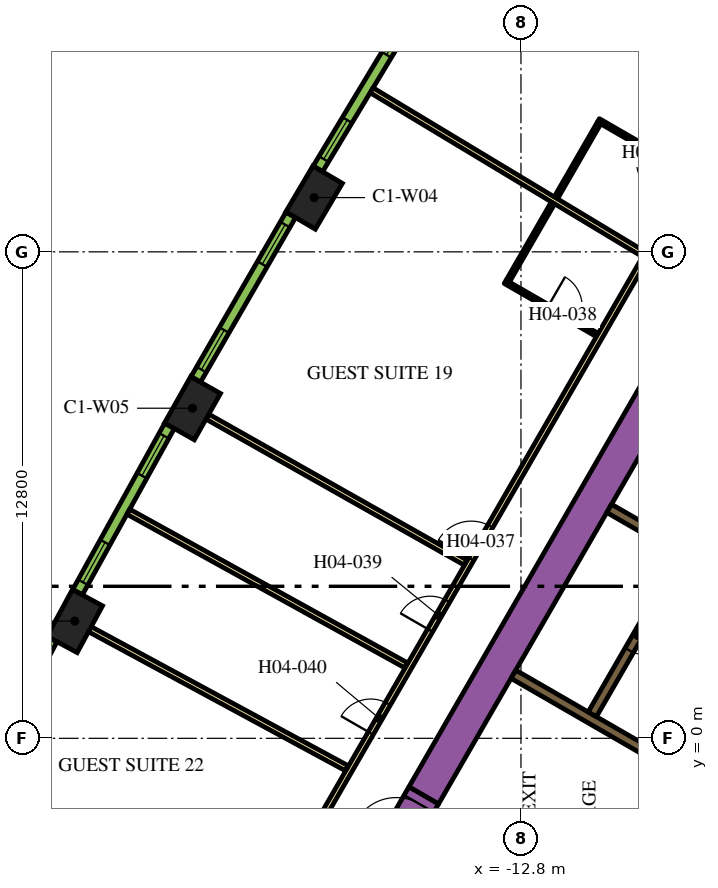
"""IFC4 building model, lengths in metres.
Left out: names, types, materials, properties, quantities, classifications, styles, units other than length and angle.
Written with IfcOpenShell. Run it as: python <this file> out.ifc"""

import sys

from ifc_helpers import new_model, si_unit, direction, frame, frame_2d, origin, origin_2d, place, context, subcontext, project, spatial, rectangle, extrude, element, fill, save


model = new_model("IFC4")
c1 = context("Model", 3, precision=1e-05, world=origin(), true_north=direction((0.0, 1.0)))
c2 = subcontext(c1, "Body", "Model", "MODEL_VIEW")
j1 = project(units=[si_unit("LENGTHUNIT", "METRE"), si_unit("PLANEANGLEUNIT", "RADIAN")], contexts=[c1])
p1 = place(None, origin())
s1 = spatial("IfcSite", under=j1, at=p1, CompositionType="ELEMENT")
p2 = place(p1, origin())
s2 = spatial("IfcBuilding", under=s1, at=p2, CompositionType="ELEMENT")
p3 = place(p2, frame((0.0, 0.0, 70.5)))
s3 = spatial("IfcBuildingStorey", under=s2, at=p3, CompositionType="ELEMENT", Elevation=70.5)
for number, where, z_axis, x_axis in (
    (1, (-18.243, 14.228, 0.0), (0.0, 0.0, 1.0), (-0.508, -0.861, 0.0)),
    (2, (-21.443, 8.685, 0.0), (0.0, 0.0, 1.0), (-0.492, -0.871, 0.0)),
    (3, (-24.54, 3.085, 0.0), (0.0, 0.0, 1.0), (-0.476, -0.88, 0.0)),
):
    element("IfcColumn", number, at=place(p3, frame(where, z_axis=z_axis, x_axis=x_axis)), inside=s3, PredefinedType="COLUMN", context=c2, shape_type="SweptSolid", body=[
        extrude(rectangle(XDim=1.4, YDim=0.9, at=origin_2d()), origin(), (0.0, 0.0, 1.0), 3.9),
    ])
p4 = place(p3, frame((-15.36, -1.503, 0.0), z_axis=(0.0, 0.0, 1.0), x_axis=(0.50000389221, 0.866023156604, 0.0)))
e4 = element("IfcWall", 4, at=p4, inside=s3, PredefinedType="SOLIDWALL", context=c2, shape_type="SweptSolid", body=[
    extrude(rectangle(XDim=21.0, YDim=0.9, at=frame_2d((10.5, 0.0))), origin(), (0.0, 0.0, 1.0), 3.9),
])
p5 = place(p3, frame((-8.106, -1.14, 0.0), z_axis=(0.0, 0.0, 1.0), x_axis=(-0.866000643155, 0.500042884217, 0.0)))
e5 = element("IfcWall", 5, at=p5, inside=s3, PredefinedType="SOLIDWALL", context=c2, shape_type="SweptSolid", body=[
    extrude(rectangle(XDim=5.65, YDim=0.25, at=frame_2d((2.825, 0.0))), origin(), (0.0, 0.0, 1.0), 3.9),
])
p6 = place(p3, frame((-8.574, 4.95, 0.0), z_axis=(0.0, 0.0, 1.0), x_axis=(-0.866008176907, 0.50002983664, 0.0)))
e6 = element("IfcWall", 6, at=p6, inside=s3, PredefinedType="SOLIDWALL", context=c2, shape_type="SweptSolid", body=[
    extrude(rectangle(XDim=2.2, YDim=0.25, at=frame_2d((1.1, 0.0))), origin(), (0.0, 0.0, 1.0), 3.9),
])
p7 = place(p3, frame((-6.008, 9.144, 0.0), z_axis=(0.0, 0.0, 1.0), x_axis=(-0.500006956611, -0.866021387346, 0.0)))
e7 = element("IfcWall", 7, at=p7, inside=s3, PredefinedType="SOLIDWALL", context=c2, shape_type="SweptSolid", body=[
    extrude(rectangle(XDim=9.83, YDim=0.25, at=frame_2d((4.915, 0.0))), origin(), (0.0, 0.0, 1.0), 3.9),
])
p8 = place(p7, frame((6.985, 0.0, 0.0)))
e8 = element("IfcOpeningElement", 8, at=p8, cuts=e7, PredefinedType="OPENING", context=c2, shape_type="SweptSolid", body=[
    extrude(rectangle(XDim=0.9, YDim=2.1, at=frame_2d((0.45, 1.05))), frame((0.0, 0.135, 0.0), z_axis=(0.0, -1.0, 0.0), x_axis=(1.0, 0.0, 0.0)), (0.0, 0.0, 1.0), 0.27),
])
p9 = place(p3, frame((-16.209, -2.976, 0.0), z_axis=(0.0, 0.0, 1.0), x_axis=(0.499954529098, 0.86605165483, 0.0)))
e9 = element("IfcWall", 9, at=p9, inside=s3, PredefinedType="SOLIDWALL", context=c2, shape_type="SweptSolid", body=[
    extrude(rectangle(XDim=1.7, YDim=0.9, at=frame_2d((0.85, 0.0))), origin(), (0.0, 0.0, 1.0), 3.9),
])
p10 = place(p9, frame((0.25, 0.0, 0.0)))
e10 = element("IfcOpeningElement", 10, at=p10, cuts=e9, PredefinedType="OPENING", context=c2, shape_type="SweptSolid", body=[
    extrude(rectangle(XDim=1.2, YDim=2.1, at=frame_2d((0.6, 1.05))), frame((0.0, 0.46, 0.0), z_axis=(0.0, -1.0, 0.0), x_axis=(1.0, 0.0, 0.0)), (0.0, 0.0, 1.0), 0.92),
])
p11 = place(p3, frame((-19.081, -3.9, 0.0), z_axis=(0.0, 0.0, 1.0), x_axis=(0.499998313975, 0.866026377209, 0.0)))
e11 = element("IfcWall", 11, at=p11, inside=s3, PredefinedType="PARTITIONING", context=c2, shape_type="SweptSolid", body=[
    extrude(rectangle(XDim=25.766, YDim=0.15, at=frame_2d((12.883, 0.0))), origin(), (0.0, 0.0, 1.0), 2.75),
])
p12 = place(p11, frame((24.586, 0.0, 0.0)))
e12 = element("IfcOpeningElement", 12, at=p12, cuts=e11, PredefinedType="OPENING", context=c2, shape_type="SweptSolid", body=[
    extrude(rectangle(XDim=1.0, YDim=2.1, at=frame_2d((0.5, 1.05))), frame((0.0, 0.085, 0.0), z_axis=(0.0, -1.0, 0.0), x_axis=(1.0, 0.0, 0.0)), (0.0, 0.0, 1.0), 0.17),
])
p13 = place(p11, frame((9.948, 0.0, 0.0)))
e13 = element("IfcOpeningElement", 13, at=p13, cuts=e11, PredefinedType="OPENING", context=c2, shape_type="SweptSolid", body=[
    extrude(rectangle(XDim=1.0, YDim=2.1, at=frame_2d((0.5, 1.05))), frame((0.0, 0.085, 0.0), z_axis=(0.0, -1.0, 0.0), x_axis=(1.0, 0.0, 0.0)), (0.0, 0.0, 1.0), 0.17),
])
p14 = place(p11, frame((7.782, 0.0, 0.0)))
e14 = element("IfcOpeningElement", 14, at=p14, cuts=e11, PredefinedType="OPENING", context=c2, shape_type="SweptSolid", body=[
    extrude(rectangle(XDim=0.9, YDim=2.1, at=frame_2d((0.45, 1.05))), frame((0.0, 0.085, 0.0), z_axis=(0.0, -1.0, 0.0), x_axis=(1.0, 0.0, 0.0)), (0.0, 0.0, 1.0), 0.17),
])
p15 = place(p11, frame((4.658, 0.0, 0.0)))
e15 = element("IfcOpeningElement", 15, at=p15, cuts=e11, PredefinedType="OPENING", context=c2, shape_type="SweptSolid", body=[
    extrude(rectangle(XDim=0.9, YDim=2.1, at=frame_2d((0.45, 1.05))), frame((0.0, 0.085, 0.0), z_axis=(0.0, -1.0, 0.0), x_axis=(1.0, 0.0, 0.0)), (0.0, 0.0, 1.0), 0.17),
])
p16 = place(p3, frame((-24.145, 2.871, 0.0), z_axis=(0.0, 0.0, 1.0), x_axis=(0.879551725039, -0.475803281809, 0.0)))
e16 = element("IfcWall", 16, at=p16, inside=s3, PredefinedType="PARTITIONING", context=c2, shape_type="SweptSolid", body=[
    extrude(rectangle(XDim=7.688, YDim=0.15, at=frame_2d((3.844, 0.0))), origin(), (0.0, 0.0, 1.0), 2.75),
])
p17 = place(p3, frame((-23.132, 5.962, 0.0), z_axis=(0.0, 0.0, 1.0), x_axis=(0.875121716713, -0.483902863121, 0.0)))
e17 = element("IfcWall", 17, at=p17, inside=s3, PredefinedType="PARTITIONING", context=c2, shape_type="SweptSolid", body=[
    extrude(rectangle(XDim=8.355, YDim=0.15, at=frame_2d((4.178, 0.0))), origin(), (0.0, 0.0, 1.0), 2.75),
])
p18 = place(p3, frame((-21.052, 8.464, 0.0), z_axis=(0.0, 0.0, 1.0), x_axis=(0.87059371954, -0.492002617368, 0.0)))
e18 = element("IfcWall", 18, at=p18, inside=s3, PredefinedType="PARTITIONING", context=c2, shape_type="SweptSolid", body=[
    extrude(rectangle(XDim=7.803, YDim=0.15, at=frame_2d((3.902, 0.0))), origin(), (0.0, 0.0, 1.0), 2.75),
])
p19 = place(p3, frame((-16.729, 17.052, 0.0), z_axis=(0.0, 0.0, 1.0), x_axis=(0.856630606266, -0.515930232113, 0.0)))
e19 = element("IfcWall", 19, at=p19, inside=s3, PredefinedType="PARTITIONING", context=c2, shape_type="SweptSolid", body=[
    extrude(rectangle(XDim=8.355, YDim=0.15, at=frame_2d((4.178, 0.0))), origin(), (0.0, 0.0, 1.0), 2.75),
])
p20 = place(p3, frame((-8.337, 14.861, 0.0), z_axis=(0.0, 0.0, 1.0), x_axis=(-0.866034573852, 0.49998411664, 0.0)))
e20 = element("IfcWall", 20, at=p20, inside=s3, PredefinedType="PARTITIONING", context=c2, shape_type="SweptSolid", body=[
    extrude(rectangle(XDim=2.8, YDim=0.1, at=frame_2d((1.4, 0.0))), origin(), (0.0, 0.0, 1.0), 2.75),
])
p21 = place(p20, frame((0.6, 0.0, 0.0)))
e21 = element("IfcOpeningElement", 21, at=p21, cuts=e20, PredefinedType="OPENING", context=c2, shape_type="SweptSolid", body=[
    extrude(rectangle(XDim=0.9, YDim=2.1, at=frame_2d((0.45, 1.05))), frame((0.0, 0.06, 0.0), z_axis=(0.0, -1.0, 0.0), x_axis=(1.0, 0.0, 0.0)), (0.0, 0.0, 1.0), 0.12),
])
p22 = place(p3, frame((-10.743, 16.192, 0.0), z_axis=(0.0, 0.0, 1.0), x_axis=(-0.500014167291, -0.866017224141, 0.0)))
e22 = element("IfcWall", 22, at=p22, inside=s3, PredefinedType="PARTITIONING", context=c2, shape_type="SweptSolid", body=[
    extrude(rectangle(XDim=2.27, YDim=0.1, at=frame_2d((1.135, 0.0))), origin(), (0.0, 0.0, 1.0), 2.75),
])
p23 = place(p3, frame((-13.215, 12.011, 0.0), z_axis=(0.0, 0.0, 1.0), x_axis=(0.865996816683, -0.500049511043, 0.0)))
e23 = element("IfcWall", 23, at=p23, inside=s3, PredefinedType="PARTITIONING", context=c2, shape_type="SweptSolid", body=[
    extrude(rectangle(XDim=2.8, YDim=0.1, at=frame_2d((1.4, 0.0))), origin(), (0.0, 0.0, 1.0), 2.75),
])
p24 = place(p23, frame((1.3, 0.0, 0.0)))
e24 = element("IfcOpeningElement", 24, at=p24, cuts=e23, PredefinedType="OPENING", context=c2, shape_type="SweptSolid", body=[
    extrude(rectangle(XDim=0.9, YDim=2.1, at=frame_2d((0.45, 1.05))), frame((0.0, 0.06, 0.0), z_axis=(0.0, -1.0, 0.0), x_axis=(1.0, 0.0, 0.0)), (0.0, 0.0, 1.0), 0.12),
])
p25 = place(p3, frame((-13.147, 12.029, 0.0), z_axis=(0.0, 0.0, 1.0), x_axis=(0.499939447199, 0.866060361138, 0.0)))
e25 = element("IfcWall", 25, at=p25, inside=s3, PredefinedType="PARTITIONING", context=c2, shape_type="SweptSolid", body=[
    extrude(rectangle(XDim=2.37, YDim=0.1, at=frame_2d((1.185, 0.0))), origin(), (0.0, 0.0, 1.0), 2.75),
])
p26 = place(p3, frame((-15.564, 19.267, 0.0), z_axis=(0.0, 0.0, 1.0), x_axis=(-0.515938796285, -0.856625448191, 0.0)))
e26 = element("IfcWall", 26, at=p26, inside=s3, PredefinedType="SOLIDWALL", context=c2, shape_type="SweptSolid", body=[
    extrude(rectangle(XDim=4.998, YDim=0.29, at=frame_2d((2.499, 0.0))), origin(), (0.0, 0.0, 1.0), 3.65),
])
p27 = place(p26, frame((0.297, 0.0, 0.9)))
e27 = element("IfcOpeningElement", 27, at=p27, cuts=e26, PredefinedType="OPENING", context=c2, shape_type="SweptSolid", body=[
    extrude(rectangle(XDim=1.2, YDim=2.15, at=frame_2d((0.6, 1.075))), frame((0.0, 0.155, 0.0), z_axis=(0.0, -1.0, 0.0), x_axis=(1.0, 0.0, 0.0)), (0.0, 0.0, 1.0), 0.31),
])
p28 = place(p26, frame((3.501, 0.0, 0.9)))
e28 = element("IfcOpeningElement", 28, at=p28, cuts=e26, PredefinedType="OPENING", context=c2, shape_type="SweptSolid", body=[
    extrude(rectangle(XDim=1.2, YDim=2.15, at=frame_2d((0.6, 1.075))), frame((0.0, 0.155, 0.0), z_axis=(0.0, -1.0, 0.0), x_axis=(1.0, 0.0, 0.0)), (0.0, 0.0, 1.0), 0.31),
])
p29 = place(p3, frame((-18.858, 13.773, 0.0), z_axis=(0.0, 0.0, 1.0), x_axis=(-0.50002123722, -0.866013142123, 0.0)))
e29 = element("IfcWall", 29, at=p29, inside=s3, PredefinedType="SOLIDWALL", context=c2, shape_type="SweptSolid", body=[
    extrude(rectangle(XDim=4.998, YDim=0.29, at=frame_2d((2.499, 0.0))), origin(), (0.0, 0.0, 1.0), 3.65),
])
p30 = place(p29, frame((0.297, 0.0, 0.9)))
e30 = element("IfcOpeningElement", 30, at=p30, cuts=e29, PredefinedType="OPENING", context=c2, shape_type="SweptSolid", body=[
    extrude(rectangle(XDim=1.2, YDim=2.15, at=frame_2d((0.6, 1.075))), frame((0.0, 0.155, 0.0), z_axis=(0.0, -1.0, 0.0), x_axis=(1.0, 0.0, 0.0)), (0.0, 0.0, 1.0), 0.31),
])
p31 = place(p29, frame((3.501, 0.0, 0.9)))
e31 = element("IfcOpeningElement", 31, at=p31, cuts=e29, PredefinedType="OPENING", context=c2, shape_type="SweptSolid", body=[
    extrude(rectangle(XDim=1.2, YDim=2.15, at=frame_2d((0.6, 1.075))), frame((0.0, 0.155, 0.0), z_axis=(0.0, -1.0, 0.0), x_axis=(1.0, 0.0, 0.0)), (0.0, 0.0, 1.0), 0.31),
])
p32 = place(p3, frame((-22.05, 8.22, 0.0), z_axis=(0.0, 0.0, 1.0), x_axis=(-0.483912572871, -0.875116347589, 0.0)))
e32 = element("IfcWall", 32, at=p32, inside=s3, PredefinedType="SOLIDWALL", context=c2, shape_type="SweptSolid", body=[
    extrude(rectangle(XDim=4.998, YDim=0.29, at=frame_2d((2.499, 0.0))), origin(), (0.0, 0.0, 1.0), 3.65),
])
p33 = place(p32, frame((0.297, 0.0, 0.9)))
e33 = element("IfcOpeningElement", 33, at=p33, cuts=e32, PredefinedType="OPENING", context=c2, shape_type="SweptSolid", body=[
    extrude(rectangle(XDim=1.2, YDim=2.15, at=frame_2d((0.6, 1.075))), frame((0.0, 0.155, 0.0), z_axis=(0.0, -1.0, 0.0), x_axis=(1.0, 0.0, 0.0)), (0.0, 0.0, 1.0), 0.31),
])
p34 = place(p32, frame((3.501, 0.0, 0.9)))
e34 = element("IfcOpeningElement", 34, at=p34, cuts=e32, PredefinedType="OPENING", context=c2, shape_type="SweptSolid", body=[
    extrude(rectangle(XDim=1.2, YDim=2.15, at=frame_2d((0.6, 1.075))), frame((0.0, 0.155, 0.0), z_axis=(0.0, -1.0, 0.0), x_axis=(1.0, 0.0, 0.0)), (0.0, 0.0, 1.0), 0.31),
])
p35 = place(p3, frame((-25.138, 2.608, 0.0), z_axis=(0.0, 0.0, 1.0), x_axis=(-0.467629620899, -0.883924509026, 0.0)))
e35 = element("IfcWall", 35, at=p35, inside=s3, PredefinedType="SOLIDWALL", context=c2, shape_type="SweptSolid", body=[
    extrude(rectangle(XDim=4.998, YDim=0.29, at=frame_2d((2.499, 0.0))), origin(), (0.0, 0.0, 1.0), 3.65),
])
p36 = place(p35, frame((0.297, 0.0, 0.9)))
e36 = element("IfcOpeningElement", 36, at=p36, cuts=e35, PredefinedType="OPENING", context=c2, shape_type="SweptSolid", body=[
    extrude(rectangle(XDim=1.2, YDim=2.15, at=frame_2d((0.6, 1.075))), frame((0.0, 0.155, 0.0), z_axis=(0.0, -1.0, 0.0), x_axis=(1.0, 0.0, 0.0)), (0.0, 0.0, 1.0), 0.31),
])
p37 = place(p35, frame((3.501, 0.0, 0.9)))
e37 = element("IfcOpeningElement", 37, at=p37, cuts=e35, PredefinedType="OPENING", context=c2, shape_type="SweptSolid", body=[
    extrude(rectangle(XDim=1.2, YDim=2.15, at=frame_2d((0.6, 1.075))), frame((0.0, 0.155, 0.0), z_axis=(0.0, -1.0, 0.0), x_axis=(1.0, 0.0, 0.0)), (0.0, 0.0, 1.0), 0.31),
])
p38 = place(p8, origin())
e38 = element("IfcDoor", 38, at=p38, inside=s3, OperationType="SINGLE_SWING_LEFT", PredefinedType="DOOR", context=c2, shape_type="SweptSolid", body=[
    extrude(rectangle(XDim=0.9, YDim=2.1, at=frame_2d((0.45, 1.05))), frame((0.0, 0.025, 0.0), z_axis=(0.0, -1.0, 0.0), x_axis=(1.0, 0.0, 0.0)), (0.0, 0.0, 1.0), 0.05),
])
fill(e8, e38)
p39 = place(p10, origin())
e39 = element("IfcDoor", 39, at=p39, inside=s3, OperationType="SINGLE_SWING_LEFT", PredefinedType="DOOR", context=c2, shape_type="SweptSolid", body=[
    extrude(rectangle(XDim=1.2, YDim=2.1, at=frame_2d((0.6, 1.05))), frame((0.0, 0.025, 0.0), z_axis=(0.0, -1.0, 0.0), x_axis=(1.0, 0.0, 0.0)), (0.0, 0.0, 1.0), 0.05),
])
fill(e10, e39)
p40 = place(p13, origin())
e40 = element("IfcDoor", 40, at=p40, inside=s3, OperationType="SINGLE_SWING_LEFT", PredefinedType="DOOR", context=c2, shape_type="SweptSolid", body=[
    extrude(rectangle(XDim=1.0, YDim=2.1, at=frame_2d((0.5, 1.05))), frame((0.0, 0.025, 0.0), z_axis=(0.0, -1.0, 0.0), x_axis=(1.0, 0.0, 0.0)), (0.0, 0.0, 1.0), 0.05),
])
fill(e13, e40)
p41 = place(p24, origin())
e41 = element("IfcDoor", 41, at=p41, inside=s3, OperationType="SINGLE_SWING_LEFT", PredefinedType="DOOR", context=c2, shape_type="SweptSolid", body=[
    extrude(rectangle(XDim=0.9, YDim=2.1, at=frame_2d((0.45, 1.05))), frame((0.0, 0.025, 0.0), z_axis=(0.0, -1.0, 0.0), x_axis=(1.0, 0.0, 0.0)), (0.0, 0.0, 1.0), 0.05),
])
fill(e24, e41)
p42 = place(p14, origin())
e42 = element("IfcDoor", 42, at=p42, inside=s3, OperationType="SINGLE_SWING_RIGHT", PredefinedType="DOOR", context=c2, shape_type="SweptSolid", body=[
    extrude(rectangle(XDim=0.9, YDim=2.1, at=frame_2d((0.45, 1.05))), frame((0.0, 0.025, 0.0), z_axis=(0.0, -1.0, 0.0), x_axis=(1.0, 0.0, 0.0)), (0.0, 0.0, 1.0), 0.05),
])
fill(e14, e42)
p43 = place(p15, origin())
e43 = element("IfcDoor", 43, at=p43, inside=s3, OperationType="SINGLE_SWING_LEFT", PredefinedType="DOOR", context=c2, shape_type="SweptSolid", body=[
    extrude(rectangle(XDim=0.9, YDim=2.1, at=frame_2d((0.45, 1.05))), frame((0.0, 0.025, 0.0), z_axis=(0.0, -1.0, 0.0), x_axis=(1.0, 0.0, 0.0)), (0.0, 0.0, 1.0), 0.05),
])
fill(e15, e43)
p44 = place(p27, origin())
e44 = element("IfcWindow", 44, at=p44, inside=s3, PartitioningType="DOUBLE_PANEL_VERTICAL", PredefinedType="WINDOW", context=c2, shape_type="SweptSolid", body=[
    extrude(rectangle(XDim=1.2, YDim=2.15, at=frame_2d((0.6, 1.075))), frame((0.0, 0.015, 0.0), z_axis=(0.0, -1.0, 0.0), x_axis=(1.0, 0.0, 0.0)), (0.0, 0.0, 1.0), 0.06),
])
fill(e27, e44)
p45 = place(p28, origin())
e45 = element("IfcWindow", 45, at=p45, inside=s3, PartitioningType="DOUBLE_PANEL_VERTICAL", PredefinedType="WINDOW", context=c2, shape_type="SweptSolid", body=[
    extrude(rectangle(XDim=1.2, YDim=2.15, at=frame_2d((0.6, 1.075))), frame((0.0, 0.015, 0.0), z_axis=(0.0, -1.0, 0.0), x_axis=(1.0, 0.0, 0.0)), (0.0, 0.0, 1.0), 0.06),
])
fill(e28, e45)
p46 = place(p30, origin())
e46 = element("IfcWindow", 46, at=p46, inside=s3, PartitioningType="DOUBLE_PANEL_VERTICAL", PredefinedType="WINDOW", context=c2, shape_type="SweptSolid", body=[
    extrude(rectangle(XDim=1.2, YDim=2.15, at=frame_2d((0.6, 1.075))), frame((0.0, 0.015, 0.0), z_axis=(0.0, -1.0, 0.0), x_axis=(1.0, 0.0, 0.0)), (0.0, 0.0, 1.0), 0.06),
])
fill(e30, e46)
p47 = place(p31, origin())
e47 = element("IfcWindow", 47, at=p47, inside=s3, PartitioningType="DOUBLE_PANEL_VERTICAL", PredefinedType="WINDOW", context=c2, shape_type="SweptSolid", body=[
    extrude(rectangle(XDim=1.2, YDim=2.15, at=frame_2d((0.6, 1.075))), frame((0.0, 0.015, 0.0), z_axis=(0.0, -1.0, 0.0), x_axis=(1.0, 0.0, 0.0)), (0.0, 0.0, 1.0), 0.06),
])
fill(e31, e47)
p48 = place(p33, origin())
e48 = element("IfcWindow", 48, at=p48, inside=s3, PartitioningType="DOUBLE_PANEL_VERTICAL", PredefinedType="WINDOW", context=c2, shape_type="SweptSolid", body=[
    extrude(rectangle(XDim=1.2, YDim=2.15, at=frame_2d((0.6, 1.075))), frame((0.0, 0.015, 0.0), z_axis=(0.0, -1.0, 0.0), x_axis=(1.0, 0.0, 0.0)), (0.0, 0.0, 1.0), 0.06),
])
fill(e33, e48)
p49 = place(p34, origin())
e49 = element("IfcWindow", 49, at=p49, inside=s3, PartitioningType="DOUBLE_PANEL_VERTICAL", PredefinedType="WINDOW", context=c2, shape_type="SweptSolid", body=[
    extrude(rectangle(XDim=1.2, YDim=2.15, at=frame_2d((0.6, 1.075))), frame((0.0, 0.015, 0.0), z_axis=(0.0, -1.0, 0.0), x_axis=(1.0, 0.0, 0.0)), (0.0, 0.0, 1.0), 0.06),
])
fill(e34, e49)
save(model, sys.argv[1])
